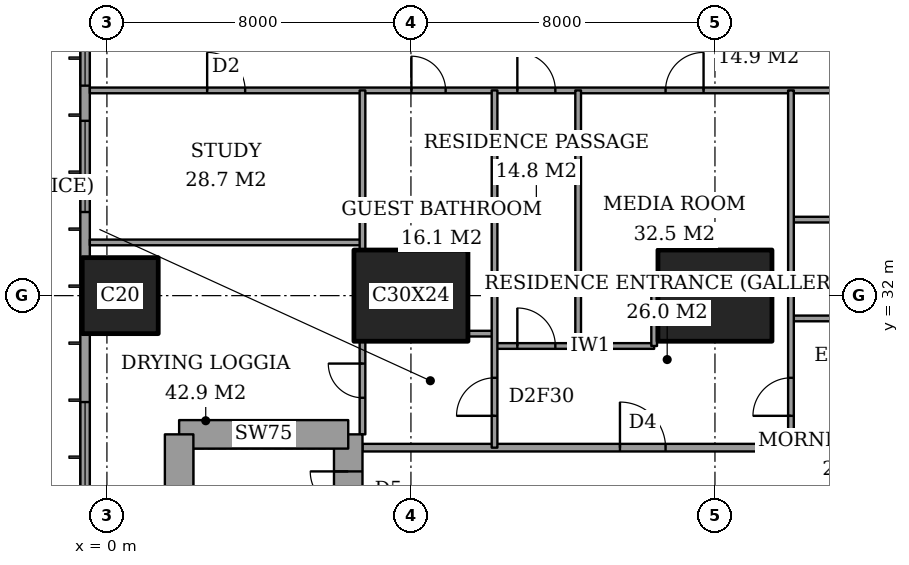
"""IFC4 building model, lengths in metres.
Left out: names, types, materials, properties, quantities, classifications, styles, units other than length and angle.
Written with IfcOpenShell. Run it as: python <this file> out.ifc"""

import sys

from ifc_helpers import new_model, si_unit, direction, frame, frame_2d, origin, origin_2d, place, context, subcontext, project, spatial, rectangle, extrude, element, fill, save


model = new_model("IFC4")
c1 = context("Model", 3, precision=1e-05, world=origin(), true_north=direction((0.0, 1.0)))
c2 = subcontext(c1, "Body", "Model", "MODEL_VIEW")
j1 = project(units=[si_unit("LENGTHUNIT", "METRE"), si_unit("PLANEANGLEUNIT", "RADIAN")], contexts=[c1])
p1 = place(None, origin())
s1 = spatial("IfcSite", under=j1, at=p1, CompositionType="ELEMENT")
p2 = place(p1, origin())
s2 = spatial("IfcBuilding", under=s1, at=p2, CompositionType="ELEMENT")
p3 = place(p2, frame((0.0, 0.0, 117.8)))
s3 = spatial("IfcBuildingStorey", under=s2, at=p3, CompositionType="ELEMENT", Elevation=117.8)
p4 = place(p3, frame((0.35, 32.0, 0.0), z_axis=(0.0, 0.0, 1.0), x_axis=(1.0, 0.0, 0.0)))
e1 = element("IfcColumn", 1, at=p4, inside=s3, PredefinedType="COLUMN", context=c2, shape_type="SweptSolid", body=[
    extrude(rectangle(XDim=2.0, YDim=2.0, at=origin_2d()), origin(), (0.0, 0.0, 1.0), 3.6),
])
for number, where, z_axis, x_axis in (
    (2, (8.0, 32.0, 0.0), (0.0, 0.0, 1.0), (1.0, 0.0, 0.0)),
    (3, (16.0, 32.0, 0.0), (0.0, 0.0, 1.0), (1.0, 0.0, 0.0)),
):
    element("IfcColumn", number, at=place(p3, frame(where, z_axis=z_axis, x_axis=x_axis)), inside=s3, PredefinedType="COLUMN", context=c2, shape_type="SweptSolid", body=[
        extrude(rectangle(XDim=3.0, YDim=2.4, at=origin_2d()), origin(), (0.0, 0.0, 1.0), 3.6),
    ])
p5 = place(p3, frame((6.35, 19.65, 0.0), z_axis=(0.0, 0.0, 1.0), x_axis=(0.0, 1.0, 0.0)))
e4 = element("IfcWall", 4, at=p5, inside=s3, PredefinedType="SHEAR", context=c2, shape_type="SweptSolid", body=[
    extrude(rectangle(XDim=8.7, YDim=0.75, at=frame_2d((4.35, 0.0))), origin(), (0.0, 0.0, 1.0), 3.6),
])
p6 = place(p5, frame((6.725, 0.0, 0.0)))
e5 = element("IfcOpeningElement", 5, at=p6, cuts=e4, PredefinedType="OPENING", context=c2, shape_type="SweptSolid", body=[
    extrude(rectangle(XDim=1.0, YDim=2.1, at=frame_2d((0.5, 1.05))), frame((0.0, 0.385, 0.0), z_axis=(0.0, -1.0, 0.0), x_axis=(1.0, 0.0, 0.0)), (0.0, 0.0, 1.0), 0.77),
])
p7 = place(p3, frame((6.35, 28.35, 0.0), z_axis=(0.0, 0.0, 1.0), x_axis=(-1.0, 0.0, 0.0)))
e6 = element("IfcWall", 6, at=p7, inside=s3, PredefinedType="SHEAR", context=c2, shape_type="SweptSolid", body=[
    extrude(rectangle(XDim=4.45, YDim=0.75, at=frame_2d((2.225, 0.0))), origin(), (0.0, 0.0, 1.0), 3.6),
])
p8 = place(p3, frame((1.9, 28.35, 0.0), z_axis=(0.0, 0.0, 1.0), x_axis=(0.0, -1.0, 0.0)))
e7 = element("IfcWall", 7, at=p8, inside=s3, PredefinedType="SHEAR", context=c2, shape_type="SweptSolid", body=[
    extrude(rectangle(XDim=8.7, YDim=0.75, at=frame_2d((4.35, 0.0))), origin(), (0.0, 0.0, 1.0), 3.6),
])
p9 = place(p3, frame((-0.575, 44.825, 0.0), z_axis=(0.0, 0.0, 1.0), x_axis=(0.0, -1.0, 0.0)))
e8 = element("IfcWall", 8, at=p9, inside=s3, PredefinedType="SOLIDWALL", context=c2, shape_type="SweptSolid", body=[
    extrude(rectangle(XDim=41.65, YDim=0.25, at=frame_2d((20.825, 0.0))), origin(), (0.0, 0.0, 1.0), 3.6),
])
p10 = place(p9, frame((0.775, 0.0, 0.4)))
e9 = element("IfcOpeningElement", 9, at=p10, cuts=e8, PredefinedType="OPENING", context=c2, shape_type="SweptSolid", body=[
    extrude(rectangle(XDim=2.4, YDim=2.2, at=frame_2d((1.2, 1.1))), frame((0.0, 0.135, 0.0), z_axis=(0.0, -1.0, 0.0), x_axis=(1.0, 0.0, 0.0)), (0.0, 0.0, 1.0), 0.27),
])
p11 = place(p9, frame((6.1, 0.0, 0.4)))
e10 = element("IfcOpeningElement", 10, at=p11, cuts=e8, PredefinedType="OPENING", context=c2, shape_type="SweptSolid", body=[
    extrude(rectangle(XDim=1.2, YDim=2.2, at=frame_2d((0.6, 1.1))), frame((0.0, 0.135, 0.0), z_axis=(0.0, -1.0, 0.0), x_axis=(1.0, 0.0, 0.0)), (0.0, 0.0, 1.0), 0.27),
])
p12 = place(p9, frame((8.225, 0.0, 0.4)))
e11 = element("IfcOpeningElement", 11, at=p12, cuts=e8, PredefinedType="OPENING", context=c2, shape_type="SweptSolid", body=[
    extrude(rectangle(XDim=2.4, YDim=2.2, at=frame_2d((1.2, 1.1))), frame((0.0, 0.135, 0.0), z_axis=(0.0, -1.0, 0.0), x_axis=(1.0, 0.0, 0.0)), (0.0, 0.0, 1.0), 0.27),
])
p13 = place(p9, frame((15.625, 0.0, 0.4)))
e12 = element("IfcOpeningElement", 12, at=p13, cuts=e8, PredefinedType="OPENING", context=c2, shape_type="SweptSolid", body=[
    extrude(rectangle(XDim=2.4, YDim=2.2, at=frame_2d((1.2, 1.1))), frame((0.0, 0.135, 0.0), z_axis=(0.0, -1.0, 0.0), x_axis=(1.0, 0.0, 0.0)), (0.0, 0.0, 1.0), 0.27),
])
p14 = place(p9, frame((23.625, 0.0, 0.4)))
e13 = element("IfcOpeningElement", 13, at=p14, cuts=e8, PredefinedType="OPENING", context=c2, shape_type="SweptSolid", body=[
    extrude(rectangle(XDim=2.4, YDim=2.2, at=frame_2d((1.2, 1.1))), frame((0.0, 0.135, 0.0), z_axis=(0.0, -1.0, 0.0), x_axis=(1.0, 0.0, 0.0)), (0.0, 0.0, 1.0), 0.27),
])
p15 = place(p9, frame((30.825, 0.0, 0.4)))
e14 = element("IfcOpeningElement", 14, at=p15, cuts=e8, PredefinedType="OPENING", context=c2, shape_type="SweptSolid", body=[
    extrude(rectangle(XDim=2.4, YDim=2.2, at=frame_2d((1.2, 1.1))), frame((0.0, 0.135, 0.0), z_axis=(0.0, -1.0, 0.0), x_axis=(1.0, 0.0, 0.0)), (0.0, 0.0, 1.0), 0.27),
])
p16 = place(p9, frame((34.5, 0.0, 0.4)))
e15 = element("IfcOpeningElement", 15, at=p16, cuts=e8, PredefinedType="OPENING", context=c2, shape_type="SweptSolid", body=[
    extrude(rectangle(XDim=1.2, YDim=2.2, at=frame_2d((0.6, 1.1))), frame((0.0, 0.135, 0.0), z_axis=(0.0, -1.0, 0.0), x_axis=(1.0, 0.0, 0.0)), (0.0, 0.0, 1.0), 0.27),
])
p17 = place(p9, frame((38.475, 0.0, 0.4)))
e16 = element("IfcOpeningElement", 16, at=p17, cuts=e8, PredefinedType="OPENING", context=c2, shape_type="SweptSolid", body=[
    extrude(rectangle(XDim=2.4, YDim=2.2, at=frame_2d((1.2, 1.1))), frame((0.0, 0.135, 0.0), z_axis=(0.0, -1.0, 0.0), x_axis=(1.0, 0.0, 0.0)), (0.0, 0.0, 1.0), 0.27),
])
p18 = place(p3, frame((6.725, 28.0, 0.0), z_axis=(0.0, 0.0, 1.0), x_axis=(1.0, 0.0, 0.0)))
e17 = element("IfcWall", 17, at=p18, inside=s3, PredefinedType="PARTITIONING", context=c2, shape_type="SweptSolid", body=[
    extrude(rectangle(XDim=17.275, YDim=0.2, at=frame_2d((8.637, 0.0))), origin(), (0.0, 0.0, 1.0), 3.35),
])
p19 = place(p18, frame((6.775, 0.0, 0.0)))
e18 = element("IfcOpeningElement", 18, at=p19, cuts=e17, PredefinedType="OPENING", context=c2, shape_type="SweptSolid", body=[
    extrude(rectangle(XDim=1.2, YDim=2.4, at=frame_2d((0.6, 1.2))), frame((0.0, 0.11, 0.0), z_axis=(0.0, -1.0, 0.0), x_axis=(1.0, 0.0, 0.0)), (0.0, 0.0, 1.0), 0.22),
])
p20 = place(p3, frame((10.2, 30.675, 0.0), z_axis=(0.0, 0.0, 1.0), x_axis=(1.0, 0.0, 0.0)))
e19 = element("IfcWall", 19, at=p20, inside=s3, PredefinedType="PARTITIONING", context=c2, shape_type="SweptSolid", body=[
    extrude(rectangle(XDim=4.2, YDim=0.15, at=frame_2d((2.1, 0.0))), origin(), (0.0, 0.0, 1.0), 3.35),
])
p21 = place(p20, frame((0.6, 0.0, 0.0)))
e20 = element("IfcOpeningElement", 20, at=p21, cuts=e19, PredefinedType="OPENING", context=c2, shape_type="SweptSolid", body=[
    extrude(rectangle(XDim=1.0, YDim=2.1, at=frame_2d((0.5, 1.05))), frame((0.0, 0.085, 0.0), z_axis=(0.0, -1.0, 0.0), x_axis=(1.0, 0.0, 0.0)), (0.0, 0.0, 1.0), 0.17),
])
p22 = place(p3, frame((9.5, 31.0, 0.0), z_axis=(0.0, 0.0, 1.0), x_axis=(1.0, 0.0, 0.0)))
e21 = element("IfcWall", 21, at=p22, inside=s3, PredefinedType="PARTITIONING", context=c2, shape_type="SweptSolid", body=[
    extrude(rectangle(XDim=0.7, YDim=0.15, at=frame_2d((0.35, 0.0))), origin(), (0.0, 0.0, 1.0), 3.35),
])
p23 = place(p3, frame((18.0, 31.4, 0.0), z_axis=(0.0, 0.0, 1.0), x_axis=(1.0, 0.0, 0.0)))
e22 = element("IfcWall", 22, at=p23, inside=s3, PredefinedType="PARTITIONING", context=c2, shape_type="SweptSolid", body=[
    extrude(rectangle(XDim=6.0, YDim=0.15, at=frame_2d((3.0, 0.0))), origin(), (0.0, 0.0, 1.0), 3.35),
])
p24 = place(p3, frame((17.5, 32.1, 0.0), z_axis=(0.0, 0.0, 1.0), x_axis=(1.0, 0.0, 0.0)))
e23 = element("IfcWall", 23, at=p24, inside=s3, PredefinedType="PARTITIONING", context=c2, shape_type="SweptSolid", body=[
    extrude(rectangle(XDim=0.5, YDim=0.15, at=frame_2d((0.25, 0.0))), origin(), (0.0, 0.0, 1.0), 2.634),
])
p25 = place(p3, frame((-0.45, 33.4, 0.0), z_axis=(0.0, 0.0, 1.0), x_axis=(1.0, 0.0, 0.0)))
e24 = element("IfcWall", 24, at=p25, inside=s3, PredefinedType="PARTITIONING", context=c2, shape_type="SweptSolid", body=[
    extrude(rectangle(XDim=7.175, YDim=0.15, at=frame_2d((3.587, 0.0))), origin(), (0.0, 0.0, 1.0), 3.35),
])
p26 = place(p3, frame((18.0, 34.0, 0.0), z_axis=(0.0, 0.0, 1.0), x_axis=(1.0, 0.0, 0.0)))
e25 = element("IfcWall", 25, at=p26, inside=s3, PredefinedType="PARTITIONING", context=c2, shape_type="SweptSolid", body=[
    extrude(rectangle(XDim=2.4, YDim=0.15, at=frame_2d((1.2, 0.0))), origin(), (0.0, 0.0, 1.0), 3.35),
])
p27 = place(p3, frame((-0.45, 37.4, 0.0), z_axis=(0.0, 0.0, 1.0), x_axis=(1.0, 0.0, 0.0)))
e26 = element("IfcWall", 26, at=p27, inside=s3, PredefinedType="PARTITIONING", context=c2, shape_type="SweptSolid", body=[
    extrude(rectangle(XDim=25.011, YDim=0.15, at=frame_2d((12.505, 0.0))), origin(), (0.0, 0.0, 1.0), 3.35),
])
p28 = place(p27, frame((11.25, 0.0, 0.0)))
e27 = element("IfcOpeningElement", 27, at=p28, cuts=e26, PredefinedType="OPENING", context=c2, shape_type="SweptSolid", body=[
    extrude(rectangle(XDim=1.0, YDim=2.1, at=frame_2d((0.5, 1.05))), frame((0.0, 0.085, 0.0), z_axis=(0.0, -1.0, 0.0), x_axis=(1.0, 0.0, 0.0)), (0.0, 0.0, 1.0), 0.17),
])
p29 = place(p27, frame((3.087, 0.0, 0.0)))
e28 = element("IfcOpeningElement", 28, at=p29, cuts=e26, PredefinedType="OPENING", context=c2, shape_type="SweptSolid", body=[
    extrude(rectangle(XDim=1.0, YDim=2.1, at=frame_2d((0.5, 1.05))), frame((0.0, 0.085, 0.0), z_axis=(0.0, -1.0, 0.0), x_axis=(1.0, 0.0, 0.0)), (0.0, 0.0, 1.0), 0.17),
])
p30 = place(p27, frame((8.462, 0.0, 0.0)))
e29 = element("IfcOpeningElement", 29, at=p30, cuts=e26, PredefinedType="OPENING", context=c2, shape_type="SweptSolid", body=[
    extrude(rectangle(XDim=0.9, YDim=2.1, at=frame_2d((0.45, 1.05))), frame((0.0, 0.085, 0.0), z_axis=(0.0, -1.0, 0.0), x_axis=(1.0, 0.0, 0.0)), (0.0, 0.0, 1.0), 0.17),
])
p31 = place(p27, frame((15.15, 0.0, 0.0)))
e30 = element("IfcOpeningElement", 30, at=p31, cuts=e26, PredefinedType="OPENING", context=c2, shape_type="SweptSolid", body=[
    extrude(rectangle(XDim=1.0, YDim=2.1, at=frame_2d((0.5, 1.05))), frame((0.0, 0.085, 0.0), z_axis=(0.0, -1.0, 0.0), x_axis=(1.0, 0.0, 0.0)), (0.0, 0.0, 1.0), 0.17),
])
p32 = place(p27, frame((21.175, 0.0, 0.0)))
e31 = element("IfcOpeningElement", 31, at=p32, cuts=e26, PredefinedType="OPENING", context=c2, shape_type="SweptSolid", body=[
    extrude(rectangle(XDim=1.0, YDim=2.1, at=frame_2d((0.5, 1.05))), frame((0.0, 0.085, 0.0), z_axis=(0.0, -1.0, 0.0), x_axis=(1.0, 0.0, 0.0)), (0.0, 0.0, 1.0), 0.17),
])
p33 = place(p3, frame((6.725, 28.35, 0.0), z_axis=(0.0, 0.0, 1.0), x_axis=(0.0, 1.0, 0.0)))
e32 = element("IfcWall", 32, at=p33, inside=s3, PredefinedType="PARTITIONING", context=c2, shape_type="SweptSolid", body=[
    extrude(rectangle(XDim=2.45, YDim=0.15, at=frame_2d((1.225, 0.0))), origin(), (0.0, 0.0, 1.0), 3.35),
])
p34 = place(p33, frame((0.962, 0.0, 0.0)))
e33 = element("IfcOpeningElement", 33, at=p34, cuts=e32, PredefinedType="OPENING", context=c2, shape_type="SweptSolid", body=[
    extrude(rectangle(XDim=0.9, YDim=2.1, at=frame_2d((0.45, 1.05))), frame((0.0, 0.085, 0.0), z_axis=(0.0, -1.0, 0.0), x_axis=(1.0, 0.0, 0.0)), (0.0, 0.0, 1.0), 0.17),
])
p35 = place(p3, frame((6.725, 33.2, 0.0), z_axis=(0.0, 0.0, 1.0), x_axis=(0.0, 1.0, 0.0)))
e34 = element("IfcWall", 34, at=p35, inside=s3, PredefinedType="PARTITIONING", context=c2, shape_type="SweptSolid", body=[
    extrude(rectangle(XDim=4.2, YDim=0.15, at=frame_2d((2.1, 0.0))), origin(), (0.0, 0.0, 1.0), 3.35),
])
p36 = place(p3, frame((10.2, 28.0, 0.0), z_axis=(0.0, 0.0, 1.0), x_axis=(0.0, 1.0, 0.0)))
e35 = element("IfcWall", 35, at=p36, inside=s3, PredefinedType="PARTITIONING", context=c2, shape_type="SweptSolid", body=[
    extrude(rectangle(XDim=9.4, YDim=0.15, at=frame_2d((4.7, 0.0))), origin(), (0.0, 0.0, 1.0), 3.35),
])
p37 = place(p36, frame((0.837, 0.0, 0.0)))
e36 = element("IfcOpeningElement", 36, at=p37, cuts=e35, PredefinedType="OPENING", context=c2, shape_type="SweptSolid", body=[
    extrude(rectangle(XDim=1.0, YDim=2.1, at=frame_2d((0.5, 1.05))), frame((0.0, 0.085, 0.0), z_axis=(0.0, -1.0, 0.0), x_axis=(1.0, 0.0, 0.0)), (0.0, 0.0, 1.0), 0.17),
])
p38 = place(p3, frame((12.4, 30.675, 0.0), z_axis=(0.0, 0.0, 1.0), x_axis=(0.0, 1.0, 0.0)))
e37 = element("IfcWall", 37, at=p38, inside=s3, PredefinedType="PARTITIONING", context=c2, shape_type="SweptSolid", body=[
    extrude(rectangle(XDim=6.725, YDim=0.15, at=frame_2d((3.362, 0.0))), origin(), (0.0, 0.0, 1.0), 3.35),
])
p39 = place(p3, frame((14.4, 30.675, 0.0), z_axis=(0.0, 0.0, 1.0), x_axis=(0.0, 1.0, 0.0)))
e38 = element("IfcWall", 38, at=p39, inside=s3, PredefinedType="PARTITIONING", context=c2, shape_type="SweptSolid", body=[
    extrude(rectangle(XDim=1.425, YDim=0.15, at=frame_2d((0.712, 0.0))), origin(), (0.0, 0.0, 1.0), 3.35),
])
p40 = place(p3, frame((18.0, 28.0, 0.0), z_axis=(0.0, 0.0, 1.0), x_axis=(0.0, 1.0, 0.0)))
e39 = element("IfcWall", 39, at=p40, inside=s3, PredefinedType="PARTITIONING", context=c2, shape_type="SweptSolid", body=[
    extrude(rectangle(XDim=9.4, YDim=0.15, at=frame_2d((4.7, 0.0))), origin(), (0.0, 0.0, 1.0), 3.35),
])
p41 = place(p40, frame((0.837, 0.0, 0.0)))
e40 = element("IfcOpeningElement", 40, at=p41, cuts=e39, PredefinedType="OPENING", context=c2, shape_type="SweptSolid", body=[
    extrude(rectangle(XDim=1.0, YDim=2.1, at=frame_2d((0.5, 1.05))), frame((0.0, 0.085, 0.0), z_axis=(0.0, -1.0, 0.0), x_axis=(1.0, 0.0, 0.0)), (0.0, 0.0, 1.0), 0.17),
])
p42 = place(p11, origin())
e41 = element("IfcWindow", 41, at=p42, inside=s3, PartitioningType="SINGLE_PANEL", PredefinedType="WINDOW", context=c2, shape_type="SweptSolid", body=[
    extrude(rectangle(XDim=1.2, YDim=2.2, at=frame_2d((0.6, 1.1))), frame((0.0, 0.03, 0.0), z_axis=(0.0, -1.0, 0.0), x_axis=(1.0, 0.0, 0.0)), (0.0, 0.0, 1.0), 0.06),
])
fill(e10, e41)
p43 = place(p12, origin())
e42 = element("IfcWindow", 42, at=p43, inside=s3, PartitioningType="SINGLE_PANEL", PredefinedType="WINDOW", context=c2, shape_type="SweptSolid", body=[
    extrude(rectangle(XDim=2.4, YDim=2.2, at=frame_2d((1.2, 1.1))), frame((0.0, 0.03, 0.0), z_axis=(0.0, -1.0, 0.0), x_axis=(1.0, 0.0, 0.0)), (0.0, 0.0, 1.0), 0.06),
])
fill(e11, e42)
p44 = place(p13, origin())
e43 = element("IfcWindow", 43, at=p44, inside=s3, PartitioningType="SINGLE_PANEL", PredefinedType="WINDOW", context=c2, shape_type="SweptSolid", body=[
    extrude(rectangle(XDim=2.4, YDim=2.2, at=frame_2d((1.2, 1.1))), frame((0.0, 0.03, 0.0), z_axis=(0.0, -1.0, 0.0), x_axis=(1.0, 0.0, 0.0)), (0.0, 0.0, 1.0), 0.06),
])
fill(e12, e43)
p45 = place(p28, origin())
e44 = element("IfcDoor", 44, at=p45, inside=s3, OperationType="SINGLE_SWING_RIGHT", PredefinedType="DOOR", context=c2, shape_type="SweptSolid", body=[
    extrude(rectangle(XDim=1.0, YDim=2.1, at=frame_2d((0.5, 1.05))), frame((0.0, 0.025, 0.0), z_axis=(0.0, -1.0, 0.0), x_axis=(1.0, 0.0, 0.0)), (0.0, 0.0, 1.0), 0.05),
])
fill(e27, e44)
p46 = place(p29, origin())
e45 = element("IfcDoor", 45, at=p46, inside=s3, OperationType="SINGLE_SWING_RIGHT", PredefinedType="DOOR", context=c2, shape_type="SweptSolid", body=[
    extrude(rectangle(XDim=1.0, YDim=2.1, at=frame_2d((0.5, 1.05))), frame((0.0, 0.025, 0.0), z_axis=(0.0, -1.0, 0.0), x_axis=(1.0, 0.0, 0.0)), (0.0, 0.0, 1.0), 0.05),
])
fill(e28, e45)
p47 = place(p34, origin())
e46 = element("IfcDoor", 46, at=p47, inside=s3, OperationType="SINGLE_SWING_LEFT", PredefinedType="DOOR", context=c2, shape_type="SweptSolid", body=[
    extrude(rectangle(XDim=0.9, YDim=2.1, at=frame_2d((0.45, 1.05))), frame((0.0, 0.025, 0.0), z_axis=(0.0, -1.0, 0.0), x_axis=(1.0, 0.0, 0.0)), (0.0, 0.0, 1.0), 0.05),
])
fill(e33, e46)
p48 = place(p30, origin())
e47 = element("IfcDoor", 47, at=p48, inside=s3, OperationType="SINGLE_SWING_RIGHT", PredefinedType="DOOR", context=c2, shape_type="SweptSolid", body=[
    extrude(rectangle(XDim=0.9, YDim=2.1, at=frame_2d((0.45, 1.05))), frame((0.0, 0.025, 0.0), z_axis=(0.0, -1.0, 0.0), x_axis=(1.0, 0.0, 0.0)), (0.0, 0.0, 1.0), 0.05),
])
fill(e29, e47)
p49 = place(p37, origin())
e48 = element("IfcDoor", 48, at=p49, inside=s3, OperationType="SINGLE_SWING_RIGHT", PredefinedType="DOOR", context=c2, shape_type="SweptSolid", body=[
    extrude(rectangle(XDim=1.0, YDim=2.1, at=frame_2d((0.5, 1.05))), frame((0.0, 0.025, 0.0), z_axis=(0.0, -1.0, 0.0), x_axis=(1.0, 0.0, 0.0)), (0.0, 0.0, 1.0), 0.05),
])
fill(e36, e48)
p50 = place(p19, origin())
e49 = element("IfcDoor", 49, at=p50, inside=s3, OperationType="SINGLE_SWING_RIGHT", PredefinedType="DOOR", context=c2, shape_type="SweptSolid", body=[
    extrude(rectangle(XDim=1.2, YDim=2.4, at=frame_2d((0.6, 1.2))), frame((0.0, 0.025, 0.0), z_axis=(0.0, -1.0, 0.0), x_axis=(1.0, 0.0, 0.0)), (0.0, 0.0, 1.0), 0.05),
])
fill(e18, e49)
p51 = place(p21, origin())
e50 = element("IfcDoor", 50, at=p51, inside=s3, OperationType="SINGLE_SWING_RIGHT", PredefinedType="DOOR", context=c2, shape_type="SweptSolid", body=[
    extrude(rectangle(XDim=1.0, YDim=2.1, at=frame_2d((0.5, 1.05))), frame((0.0, 0.025, 0.0), z_axis=(0.0, -1.0, 0.0), x_axis=(1.0, 0.0, 0.0)), (0.0, 0.0, 1.0), 0.05),
])
fill(e20, e50)
p52 = place(p31, origin())
e51 = element("IfcDoor", 51, at=p52, inside=s3, OperationType="SINGLE_SWING_LEFT", PredefinedType="DOOR", context=c2, shape_type="SweptSolid", body=[
    extrude(rectangle(XDim=1.0, YDim=2.1, at=frame_2d((0.5, 1.05))), frame((0.0, 0.025, 0.0), z_axis=(0.0, -1.0, 0.0), x_axis=(1.0, 0.0, 0.0)), (0.0, 0.0, 1.0), 0.05),
])
fill(e30, e51)
p53 = place(p41, origin())
e52 = element("IfcDoor", 52, at=p53, inside=s3, OperationType="SINGLE_SWING_RIGHT", PredefinedType="DOOR", context=c2, shape_type="SweptSolid", body=[
    extrude(rectangle(XDim=1.0, YDim=2.1, at=frame_2d((0.5, 1.05))), frame((0.0, 0.025, 0.0), z_axis=(0.0, -1.0, 0.0), x_axis=(1.0, 0.0, 0.0)), (0.0, 0.0, 1.0), 0.05),
])
fill(e40, e52)
p54 = place(p6, origin())
e53 = element("IfcDoor", 53, at=p54, inside=s3, OperationType="SINGLE_SWING_LEFT", PredefinedType="DOOR", context=c2, shape_type="SweptSolid", body=[
    extrude(rectangle(XDim=1.0, YDim=2.1, at=frame_2d((0.5, 1.05))), frame((0.0, 0.025, 0.0), z_axis=(0.0, -1.0, 0.0), x_axis=(1.0, 0.0, 0.0)), (0.0, 0.0, 1.0), 0.05),
])
fill(e5, e53)
save(model, sys.argv[1])
